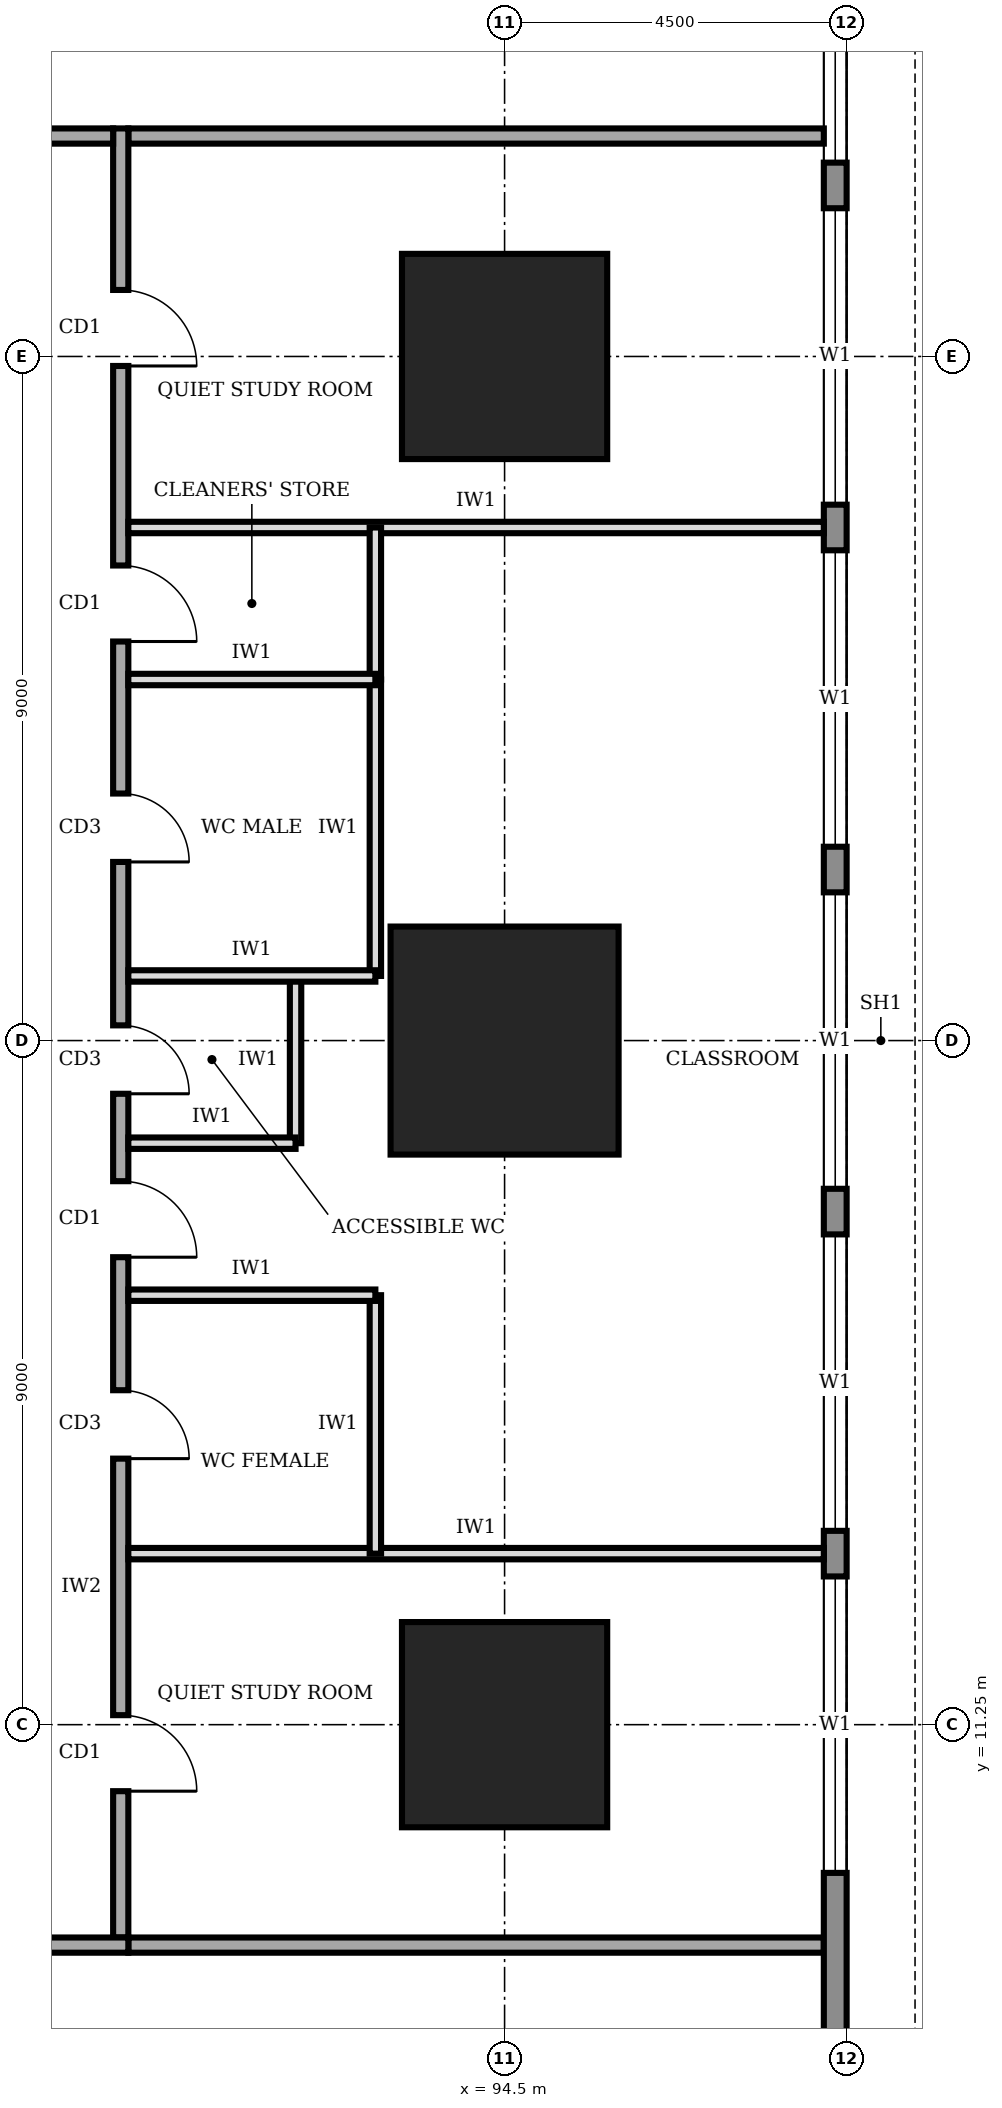
"""IFC4 building model, lengths in metres.
Left out: names, types, materials, properties, quantities, classifications, styles, units other than length and angle.
Written with IfcOpenShell. Run it as: python <this file> out.ifc"""

import sys

from ifc_helpers import new_model, si_unit, direction, frame, frame_2d, origin, origin_2d, place, context, subcontext, project, spatial, rectangle, extrude, element, fill, save


model = new_model("IFC4")
c1 = context("Model", 3, precision=1e-05, world=origin(), true_north=direction((0.0, 1.0)))
c2 = subcontext(c1, "Body", "Model", "MODEL_VIEW")
j1 = project(units=[si_unit("LENGTHUNIT", "METRE"), si_unit("PLANEANGLEUNIT", "RADIAN")], contexts=[c1])
p1 = place(None, origin())
s1 = spatial("IfcSite", under=j1, at=p1, CompositionType="ELEMENT")
p2 = place(p1, origin())
s2 = spatial("IfcBuilding", under=s1, at=p2, CompositionType="ELEMENT")
p3 = place(p2, frame((0.0, 0.0, 45.0)))
s3 = spatial("IfcBuildingStorey", under=s2, at=p3, CompositionType="ELEMENT", Elevation=45.0)
p4 = place(p3, frame((94.5, 11.25, 0.0), z_axis=(0.0, 0.0, 1.0), x_axis=(1.0, 0.0, 0.0)))
e1 = element("IfcColumn", 1, at=p4, inside=s3, PredefinedType="COLUMN", context=c2, shape_type="SweptSolid", body=[
    extrude(rectangle(XDim=2.7, YDim=2.7, at=origin_2d()), origin(), (0.0, 0.0, 1.0), 4.0),
])
p5 = place(p3, frame((94.5, 20.25, 0.0), z_axis=(0.0, 0.0, 1.0), x_axis=(1.0, 0.0, 0.0)))
e2 = element("IfcColumn", 2, at=p5, inside=s3, PredefinedType="COLUMN", context=c2, shape_type="SweptSolid", body=[
    extrude(rectangle(XDim=3.0, YDim=3.0, at=origin_2d()), origin(), (0.0, 0.0, 1.0), 4.0),
])
p6 = place(p3, frame((94.5, 29.25, 0.0), z_axis=(0.0, 0.0, 1.0), x_axis=(1.0, 0.0, 0.0)))
e3 = element("IfcColumn", 3, at=p6, inside=s3, PredefinedType="COLUMN", context=c2, shape_type="SweptSolid", body=[
    extrude(rectangle(XDim=2.7, YDim=2.7, at=origin_2d()), origin(), (0.0, 0.0, 1.0), 4.0),
])
p7 = place(p3, frame((98.85, 4.52, 0.0), z_axis=(0.0, 0.0, 1.0), x_axis=(0.0, 1.0, 0.0)))
e4 = element("IfcWall", 4, at=p7, inside=s3, PredefinedType="STANDARD", context=c2, shape_type="SweptSolid", body=[
    extrude(rectangle(XDim=31.46, YDim=0.3, at=frame_2d((15.73, 0.0))), origin(), (0.0, 0.0, 1.0), 3.75),
])
p8 = place(p7, frame((4.78, 0.0, 0.9)))
e5 = element("IfcOpeningElement", 5, at=p8, cuts=e4, PredefinedType="OPENING", context=c2, shape_type="SweptSolid", body=[
    extrude(rectangle(XDim=3.9, YDim=2.2, at=frame_2d((1.95, 1.1))), frame((0.0, 0.16, 0.0), z_axis=(0.0, -1.0, 0.0), x_axis=(1.0, 0.0, 0.0)), (0.0, 0.0, 1.0), 0.32),
])
p9 = place(p7, frame((9.28, 0.0, 0.9)))
e6 = element("IfcOpeningElement", 6, at=p9, cuts=e4, PredefinedType="OPENING", context=c2, shape_type="SweptSolid", body=[
    extrude(rectangle(XDim=3.9, YDim=2.2, at=frame_2d((1.95, 1.1))), frame((0.0, 0.16, 0.0), z_axis=(0.0, -1.0, 0.0), x_axis=(1.0, 0.0, 0.0)), (0.0, 0.0, 1.0), 0.32),
])
p10 = place(p7, frame((13.78, 0.0, 0.9)))
e7 = element("IfcOpeningElement", 7, at=p10, cuts=e4, PredefinedType="OPENING", context=c2, shape_type="SweptSolid", body=[
    extrude(rectangle(XDim=3.9, YDim=2.2, at=frame_2d((1.95, 1.1))), frame((0.0, 0.16, 0.0), z_axis=(0.0, -1.0, 0.0), x_axis=(1.0, 0.0, 0.0)), (0.0, 0.0, 1.0), 0.32),
])
p11 = place(p7, frame((18.28, 0.0, 0.9)))
e8 = element("IfcOpeningElement", 8, at=p11, cuts=e4, PredefinedType="OPENING", context=c2, shape_type="SweptSolid", body=[
    extrude(rectangle(XDim=3.9, YDim=2.2, at=frame_2d((1.95, 1.1))), frame((0.0, 0.16, 0.0), z_axis=(0.0, -1.0, 0.0), x_axis=(1.0, 0.0, 0.0)), (0.0, 0.0, 1.0), 0.32),
])
p12 = place(p7, frame((22.78, 0.0, 0.9)))
e9 = element("IfcOpeningElement", 9, at=p12, cuts=e4, PredefinedType="OPENING", context=c2, shape_type="SweptSolid", body=[
    extrude(rectangle(XDim=3.9, YDim=2.2, at=frame_2d((1.95, 1.1))), frame((0.0, 0.16, 0.0), z_axis=(0.0, -1.0, 0.0), x_axis=(1.0, 0.0, 0.0)), (0.0, 0.0, 1.0), 0.32),
])
p13 = place(p7, frame((27.28, 0.0, 0.9)))
e10 = element("IfcOpeningElement", 10, at=p13, cuts=e4, PredefinedType="OPENING", context=c2, shape_type="SweptSolid", body=[
    extrude(rectangle(XDim=3.9, YDim=2.2, at=frame_2d((1.95, 1.1))), frame((0.0, 0.16, 0.0), z_axis=(0.0, -1.0, 0.0), x_axis=(1.0, 0.0, 0.0)), (0.0, 0.0, 1.0), 0.32),
])
p14 = place(p3, frame((72.65, 8.35, 0.0), z_axis=(0.0, 0.0, 1.0), x_axis=(1.0, 0.0, 0.0)))
e11 = element("IfcWall", 11, at=p14, inside=s3, PredefinedType="SOLIDWALL", context=c2, shape_type="SweptSolid", body=[
    extrude(rectangle(XDim=16.9, YDim=0.2, at=frame_2d((8.45, 0.0))), origin(), (0.0, 0.0, 1.0), 3.75),
])
p15 = place(p14, frame((1.325, 0.0, 0.0)))
e12 = element("IfcOpeningElement", 12, at=p15, cuts=e11, PredefinedType="OPENING", context=c2, shape_type="SweptSolid", body=[
    extrude(rectangle(XDim=1.0, YDim=2.1, at=frame_2d((0.5, 1.05))), frame((0.0, 0.11, 0.0), z_axis=(0.0, -1.0, 0.0), x_axis=(1.0, 0.0, 0.0)), (0.0, 0.0, 1.0), 0.22),
])
p16 = place(p14, frame((5.6, 0.0, 0.0)))
e13 = element("IfcOpeningElement", 13, at=p16, cuts=e11, PredefinedType="OPENING", context=c2, shape_type="SweptSolid", body=[
    extrude(rectangle(XDim=1.0, YDim=2.1, at=frame_2d((0.5, 1.05))), frame((0.0, 0.11, 0.0), z_axis=(0.0, -1.0, 0.0), x_axis=(1.0, 0.0, 0.0)), (0.0, 0.0, 1.0), 0.22),
])
p17 = place(p14, frame((11.925, 0.0, 0.0)))
e14 = element("IfcOpeningElement", 14, at=p17, cuts=e11, PredefinedType="OPENING", context=c2, shape_type="SweptSolid", body=[
    extrude(rectangle(XDim=1.4, YDim=2.1, at=frame_2d((0.7, 1.05))), frame((0.0, 0.11, 0.0), z_axis=(0.0, -1.0, 0.0), x_axis=(1.0, 0.0, 0.0)), (0.0, 0.0, 1.0), 0.22),
])
p18 = place(p3, frame((89.45, 8.45, 0.0), z_axis=(0.0, 0.0, 1.0), x_axis=(0.0, 1.0, 0.0)))
e15 = element("IfcWall", 15, at=p18, inside=s3, PredefinedType="SOLIDWALL", context=c2, shape_type="SweptSolid", body=[
    extrude(rectangle(XDim=23.8, YDim=0.2, at=frame_2d((11.9, 0.0))), origin(), (0.0, 0.0, 1.0), 3.75),
])
p19 = place(p18, frame((1.925, 0.0, 0.0)))
e16 = element("IfcOpeningElement", 16, at=p19, cuts=e15, PredefinedType="OPENING", context=c2, shape_type="SweptSolid", body=[
    extrude(rectangle(XDim=1.0, YDim=2.1, at=frame_2d((0.5, 1.05))), frame((0.0, 0.11, 0.0), z_axis=(0.0, -1.0, 0.0), x_axis=(1.0, 0.0, 0.0)), (0.0, 0.0, 1.0), 0.22),
])
p20 = place(p18, frame((6.3, 0.0, 0.0)))
e17 = element("IfcOpeningElement", 17, at=p20, cuts=e15, PredefinedType="OPENING", context=c2, shape_type="SweptSolid", body=[
    extrude(rectangle(XDim=0.9, YDim=2.1, at=frame_2d((0.45, 1.05))), frame((0.0, 0.11, 0.0), z_axis=(0.0, -1.0, 0.0), x_axis=(1.0, 0.0, 0.0)), (0.0, 0.0, 1.0), 0.22),
])
p21 = place(p18, frame((11.1, 0.0, 0.0)))
e18 = element("IfcOpeningElement", 18, at=p21, cuts=e15, PredefinedType="OPENING", context=c2, shape_type="SweptSolid", body=[
    extrude(rectangle(XDim=0.9, YDim=2.1, at=frame_2d((0.45, 1.05))), frame((0.0, 0.11, 0.0), z_axis=(0.0, -1.0, 0.0), x_axis=(1.0, 0.0, 0.0)), (0.0, 0.0, 1.0), 0.22),
])
p22 = place(p18, frame((14.15, 0.0, 0.0)))
e19 = element("IfcOpeningElement", 19, at=p22, cuts=e15, PredefinedType="OPENING", context=c2, shape_type="SweptSolid", body=[
    extrude(rectangle(XDim=0.9, YDim=2.1, at=frame_2d((0.45, 1.05))), frame((0.0, 0.11, 0.0), z_axis=(0.0, -1.0, 0.0), x_axis=(1.0, 0.0, 0.0)), (0.0, 0.0, 1.0), 0.22),
])
p23 = place(p18, frame((17.05, 0.0, 0.0)))
e20 = element("IfcOpeningElement", 20, at=p23, cuts=e15, PredefinedType="OPENING", context=c2, shape_type="SweptSolid", body=[
    extrude(rectangle(XDim=1.0, YDim=2.1, at=frame_2d((0.5, 1.05))), frame((0.0, 0.11, 0.0), z_axis=(0.0, -1.0, 0.0), x_axis=(1.0, 0.0, 0.0)), (0.0, 0.0, 1.0), 0.22),
])
p24 = place(p18, frame((8.95, 0.0, 0.0)))
e21 = element("IfcOpeningElement", 21, at=p24, cuts=e15, PredefinedType="OPENING", context=c2, shape_type="SweptSolid", body=[
    extrude(rectangle(XDim=1.0, YDim=2.1, at=frame_2d((0.5, 1.05))), frame((0.0, 0.11, 0.0), z_axis=(0.0, -1.0, 0.0), x_axis=(1.0, 0.0, 0.0)), (0.0, 0.0, 1.0), 0.22),
])
p25 = place(p18, frame((20.675, 0.0, 0.0)))
e22 = element("IfcOpeningElement", 22, at=p25, cuts=e15, PredefinedType="OPENING", context=c2, shape_type="SweptSolid", body=[
    extrude(rectangle(XDim=1.0, YDim=2.1, at=frame_2d((0.5, 1.05))), frame((0.0, 0.11, 0.0), z_axis=(0.0, -1.0, 0.0), x_axis=(1.0, 0.0, 0.0)), (0.0, 0.0, 1.0), 0.22),
])
p26 = place(p3, frame((89.35, 32.15, 0.0), z_axis=(0.0, 0.0, 1.0), x_axis=(-1.0, 0.0, 0.0)))
e23 = element("IfcWall", 23, at=p26, inside=s3, PredefinedType="SOLIDWALL", context=c2, shape_type="SweptSolid", body=[
    extrude(rectangle(XDim=16.9, YDim=0.2, at=frame_2d((8.45, 0.0))), origin(), (0.0, 0.0, 1.0), 3.75),
])
p27 = place(p26, frame((14.375, 0.0, 0.0)))
e24 = element("IfcOpeningElement", 24, at=p27, cuts=e23, PredefinedType="OPENING", context=c2, shape_type="SweptSolid", body=[
    extrude(rectangle(XDim=1.0, YDim=2.1, at=frame_2d((0.5, 1.05))), frame((0.0, 0.11, 0.0), z_axis=(0.0, -1.0, 0.0), x_axis=(1.0, 0.0, 0.0)), (0.0, 0.0, 1.0), 0.22),
])
p28 = place(p26, frame((7.85, 0.0, 0.0)))
e25 = element("IfcOpeningElement", 25, at=p28, cuts=e23, PredefinedType="OPENING", context=c2, shape_type="SweptSolid", body=[
    extrude(rectangle(XDim=1.0, YDim=2.1, at=frame_2d((0.5, 1.05))), frame((0.0, 0.11, 0.0), z_axis=(0.0, -1.0, 0.0), x_axis=(1.0, 0.0, 0.0)), (0.0, 0.0, 1.0), 0.22),
])
p29 = place(p26, frame((1.325, 0.0, 0.0)))
e26 = element("IfcOpeningElement", 26, at=p29, cuts=e23, PredefinedType="OPENING", context=c2, shape_type="SweptSolid", body=[
    extrude(rectangle(XDim=1.0, YDim=2.1, at=frame_2d((0.5, 1.05))), frame((0.0, 0.11, 0.0), z_axis=(0.0, -1.0, 0.0), x_axis=(1.0, 0.0, 0.0)), (0.0, 0.0, 1.0), 0.22),
])
for number, where, z_axis, x_axis in (
    (27, (89.55, 8.35, 0.0), (0.0, 0.0, 1.0), (1.0, 0.0, 0.0)),
    (28, (89.55, 32.15, 0.0), (0.0, 0.0, 1.0), (1.0, 0.0, 0.0)),
):
    element("IfcWall", number, at=place(p3, frame(where, z_axis=z_axis, x_axis=x_axis)), inside=s3, PredefinedType="SOLIDWALL", context=c2, shape_type="SweptSolid", body=[
        extrude(rectangle(XDim=9.15, YDim=0.2, at=frame_2d((4.575, 0.0))), origin(), (0.0, 0.0, 1.0), 3.75),
    ])
for number, where, z_axis, x_axis in (
    (29, (89.55, 13.5, 0.0), (0.0, 0.0, 1.0), (1.0, 0.0, 0.0)),
    (30, (89.55, 27.0, 0.0), (0.0, 0.0, 1.0), (1.0, 0.0, 0.0)),
):
    element("IfcWall", number, at=place(p3, frame(where, z_axis=z_axis, x_axis=x_axis)), inside=s3, PredefinedType="PARTITIONING", context=c2, shape_type="SweptSolid", body=[
        extrude(rectangle(XDim=9.15, YDim=0.15, at=frame_2d((4.575, 0.0))), origin(), (0.0, 0.0, 1.0), 3.75),
    ])
p30 = place(p3, frame((89.55, 16.9, 0.0), z_axis=(0.0, 0.0, 1.0), x_axis=(1.0, 0.0, 0.0)))
e31 = element("IfcWall", 31, at=p30, inside=s3, PredefinedType="PARTITIONING", context=c2, shape_type="SweptSolid", body=[
    extrude(rectangle(XDim=3.25, YDim=0.15, at=frame_2d((1.625, 0.0))), origin(), (0.0, 0.0, 1.0), 3.75),
])
p31 = place(p3, frame((89.55, 18.9, 0.0), z_axis=(0.0, 0.0, 1.0), x_axis=(1.0, 0.0, 0.0)))
e32 = element("IfcWall", 32, at=p31, inside=s3, PredefinedType="PARTITIONING", context=c2, shape_type="SweptSolid", body=[
    extrude(rectangle(XDim=2.2, YDim=0.15, at=frame_2d((1.1, 0.0))), origin(), (0.0, 0.0, 1.0), 3.75),
])
p32 = place(p3, frame((89.55, 21.1, 0.0), z_axis=(0.0, 0.0, 1.0), x_axis=(1.0, 0.0, 0.0)))
e33 = element("IfcWall", 33, at=p32, inside=s3, PredefinedType="PARTITIONING", context=c2, shape_type="SweptSolid", body=[
    extrude(rectangle(XDim=3.25, YDim=0.15, at=frame_2d((1.625, 0.0))), origin(), (0.0, 0.0, 1.0), 2.85),
])
p33 = place(p3, frame((89.55, 25.0, 0.0), z_axis=(0.0, 0.0, 1.0), x_axis=(1.0, 0.0, 0.0)))
e34 = element("IfcWall", 34, at=p33, inside=s3, PredefinedType="PARTITIONING", context=c2, shape_type="SweptSolid", body=[
    extrude(rectangle(XDim=3.25, YDim=0.15, at=frame_2d((1.625, 0.0))), origin(), (0.0, 0.0, 1.0), 3.75),
])
p34 = place(p3, frame((92.8, 13.5, 0.0), z_axis=(0.0, 0.0, 1.0), x_axis=(0.0, 1.0, 0.0)))
e35 = element("IfcWall", 35, at=p34, inside=s3, PredefinedType="PARTITIONING", context=c2, shape_type="SweptSolid", body=[
    extrude(rectangle(XDim=3.4, YDim=0.15, at=frame_2d((1.7, 0.0))), origin(), (0.0, 0.0, 1.0), 3.75),
])
p35 = place(p3, frame((91.75, 18.9, 0.0), z_axis=(0.0, 0.0, 1.0), x_axis=(0.0, 1.0, 0.0)))
e36 = element("IfcWall", 36, at=p35, inside=s3, PredefinedType="PARTITIONING", context=c2, shape_type="SweptSolid", body=[
    extrude(rectangle(XDim=2.2, YDim=0.15, at=frame_2d((1.1, 0.0))), origin(), (0.0, 0.0, 1.0), 3.75),
])
p36 = place(p3, frame((92.8, 21.1, 0.0), z_axis=(0.0, 0.0, 1.0), x_axis=(0.0, 1.0, 0.0)))
e37 = element("IfcWall", 37, at=p36, inside=s3, PredefinedType="PARTITIONING", context=c2, shape_type="SweptSolid", body=[
    extrude(rectangle(XDim=3.9, YDim=0.15, at=frame_2d((1.95, 0.0))), origin(), (0.0, 0.0, 1.0), 3.75),
])
p37 = place(p3, frame((92.8, 25.0, 0.0), z_axis=(0.0, 0.0, 1.0), x_axis=(0.0, 1.0, 0.0)))
e38 = element("IfcWall", 38, at=p37, inside=s3, PredefinedType="PARTITIONING", context=c2, shape_type="SweptSolid", body=[
    extrude(rectangle(XDim=2.0, YDim=0.15, at=frame_2d((1.0, 0.0))), origin(), (0.0, 0.0, 1.0), 3.75),
])
p38 = place(p8, origin())
e39 = element("IfcWindow", 39, at=p38, inside=s3, PartitioningType="SINGLE_PANEL", PredefinedType="WINDOW", context=c2, shape_type="SweptSolid", body=[
    extrude(rectangle(XDim=3.9, YDim=2.2, at=frame_2d((1.95, 1.1))), frame((0.0, 0.03, 0.0), z_axis=(0.0, -1.0, 0.0), x_axis=(1.0, 0.0, 0.0)), (0.0, 0.0, 1.0), 0.06),
])
fill(e5, e39)
p39 = place(p9, origin())
e40 = element("IfcWindow", 40, at=p39, inside=s3, PartitioningType="SINGLE_PANEL", PredefinedType="WINDOW", context=c2, shape_type="SweptSolid", body=[
    extrude(rectangle(XDim=3.9, YDim=2.2, at=frame_2d((1.95, 1.1))), frame((0.0, 0.03, 0.0), z_axis=(0.0, -1.0, 0.0), x_axis=(1.0, 0.0, 0.0)), (0.0, 0.0, 1.0), 0.06),
])
fill(e6, e40)
p40 = place(p10, origin())
e41 = element("IfcWindow", 41, at=p40, inside=s3, PartitioningType="SINGLE_PANEL", PredefinedType="WINDOW", context=c2, shape_type="SweptSolid", body=[
    extrude(rectangle(XDim=3.9, YDim=2.2, at=frame_2d((1.95, 1.1))), frame((0.0, 0.03, 0.0), z_axis=(0.0, -1.0, 0.0), x_axis=(1.0, 0.0, 0.0)), (0.0, 0.0, 1.0), 0.06),
])
fill(e7, e41)
p41 = place(p11, origin())
e42 = element("IfcWindow", 42, at=p41, inside=s3, PartitioningType="SINGLE_PANEL", PredefinedType="WINDOW", context=c2, shape_type="SweptSolid", body=[
    extrude(rectangle(XDim=3.9, YDim=2.2, at=frame_2d((1.95, 1.1))), frame((0.0, 0.03, 0.0), z_axis=(0.0, -1.0, 0.0), x_axis=(1.0, 0.0, 0.0)), (0.0, 0.0, 1.0), 0.06),
])
fill(e8, e42)
p42 = place(p12, origin())
e43 = element("IfcWindow", 43, at=p42, inside=s3, PartitioningType="SINGLE_PANEL", PredefinedType="WINDOW", context=c2, shape_type="SweptSolid", body=[
    extrude(rectangle(XDim=3.9, YDim=2.2, at=frame_2d((1.95, 1.1))), frame((0.0, 0.03, 0.0), z_axis=(0.0, -1.0, 0.0), x_axis=(1.0, 0.0, 0.0)), (0.0, 0.0, 1.0), 0.06),
])
fill(e9, e43)
p43 = place(p13, origin())
e44 = element("IfcWindow", 44, at=p43, inside=s3, PartitioningType="SINGLE_PANEL", PredefinedType="WINDOW", context=c2, shape_type="SweptSolid", body=[
    extrude(rectangle(XDim=3.9, YDim=2.2, at=frame_2d((1.95, 1.1))), frame((0.0, 0.03, 0.0), z_axis=(0.0, -1.0, 0.0), x_axis=(1.0, 0.0, 0.0)), (0.0, 0.0, 1.0), 0.06),
])
fill(e10, e44)
p44 = place(p19, frame((1.0, 0.0, 0.0), z_axis=(0.0, 0.0, 1.0), x_axis=(-1.0, 0.0, 0.0)))
e45 = element("IfcDoor", 45, at=p44, inside=s3, OperationType="SINGLE_SWING_RIGHT", PredefinedType="DOOR", context=c2, shape_type="SweptSolid", body=[
    extrude(rectangle(XDim=1.0, YDim=2.1, at=frame_2d((0.5, 1.05))), frame((0.0, 0.025, 0.0), z_axis=(0.0, -1.0, 0.0), x_axis=(1.0, 0.0, 0.0)), (0.0, 0.0, 1.0), 0.05),
])
fill(e16, e45)
p45 = place(p20, frame((0.9, 0.0, 0.0), z_axis=(0.0, 0.0, 1.0), x_axis=(-1.0, 0.0, 0.0)))
e46 = element("IfcDoor", 46, at=p45, inside=s3, OperationType="SINGLE_SWING_RIGHT", PredefinedType="DOOR", context=c2, shape_type="SweptSolid", body=[
    extrude(rectangle(XDim=0.9, YDim=2.1, at=frame_2d((0.45, 1.05))), frame((0.0, 0.025, 0.0), z_axis=(0.0, -1.0, 0.0), x_axis=(1.0, 0.0, 0.0)), (0.0, 0.0, 1.0), 0.05),
])
fill(e17, e46)
p46 = place(p21, frame((0.9, 0.0, 0.0), z_axis=(0.0, 0.0, 1.0), x_axis=(-1.0, 0.0, 0.0)))
e47 = element("IfcDoor", 47, at=p46, inside=s3, OperationType="SINGLE_SWING_RIGHT", PredefinedType="DOOR", context=c2, shape_type="SweptSolid", body=[
    extrude(rectangle(XDim=0.9, YDim=2.1, at=frame_2d((0.45, 1.05))), frame((0.0, 0.025, 0.0), z_axis=(0.0, -1.0, 0.0), x_axis=(1.0, 0.0, 0.0)), (0.0, 0.0, 1.0), 0.05),
])
fill(e18, e47)
p47 = place(p22, frame((0.9, 0.0, 0.0), z_axis=(0.0, 0.0, 1.0), x_axis=(-1.0, 0.0, 0.0)))
e48 = element("IfcDoor", 48, at=p47, inside=s3, OperationType="SINGLE_SWING_RIGHT", PredefinedType="DOOR", context=c2, shape_type="SweptSolid", body=[
    extrude(rectangle(XDim=0.9, YDim=2.1, at=frame_2d((0.45, 1.05))), frame((0.0, 0.025, 0.0), z_axis=(0.0, -1.0, 0.0), x_axis=(1.0, 0.0, 0.0)), (0.0, 0.0, 1.0), 0.05),
])
fill(e19, e48)
p48 = place(p23, frame((1.0, 0.0, 0.0), z_axis=(0.0, 0.0, 1.0), x_axis=(-1.0, 0.0, 0.0)))
e49 = element("IfcDoor", 49, at=p48, inside=s3, OperationType="SINGLE_SWING_RIGHT", PredefinedType="DOOR", context=c2, shape_type="SweptSolid", body=[
    extrude(rectangle(XDim=1.0, YDim=2.1, at=frame_2d((0.5, 1.05))), frame((0.0, 0.025, 0.0), z_axis=(0.0, -1.0, 0.0), x_axis=(1.0, 0.0, 0.0)), (0.0, 0.0, 1.0), 0.05),
])
fill(e20, e49)
p49 = place(p24, frame((1.0, 0.0, 0.0), z_axis=(0.0, 0.0, 1.0), x_axis=(-1.0, 0.0, 0.0)))
e50 = element("IfcDoor", 50, at=p49, inside=s3, OperationType="SINGLE_SWING_RIGHT", PredefinedType="DOOR", context=c2, shape_type="SweptSolid", body=[
    extrude(rectangle(XDim=1.0, YDim=2.1, at=frame_2d((0.5, 1.05))), frame((0.0, 0.025, 0.0), z_axis=(0.0, -1.0, 0.0), x_axis=(1.0, 0.0, 0.0)), (0.0, 0.0, 1.0), 0.05),
])
fill(e21, e50)
p50 = place(p25, frame((1.0, 0.0, 0.0), z_axis=(0.0, 0.0, 1.0), x_axis=(-1.0, 0.0, 0.0)))
e51 = element("IfcDoor", 51, at=p50, inside=s3, OperationType="SINGLE_SWING_RIGHT", PredefinedType="DOOR", context=c2, shape_type="SweptSolid", body=[
    extrude(rectangle(XDim=1.0, YDim=2.1, at=frame_2d((0.5, 1.05))), frame((0.0, 0.025, 0.0), z_axis=(0.0, -1.0, 0.0), x_axis=(1.0, 0.0, 0.0)), (0.0, 0.0, 1.0), 0.05),
])
fill(e22, e51)
save(model, sys.argv[1])
